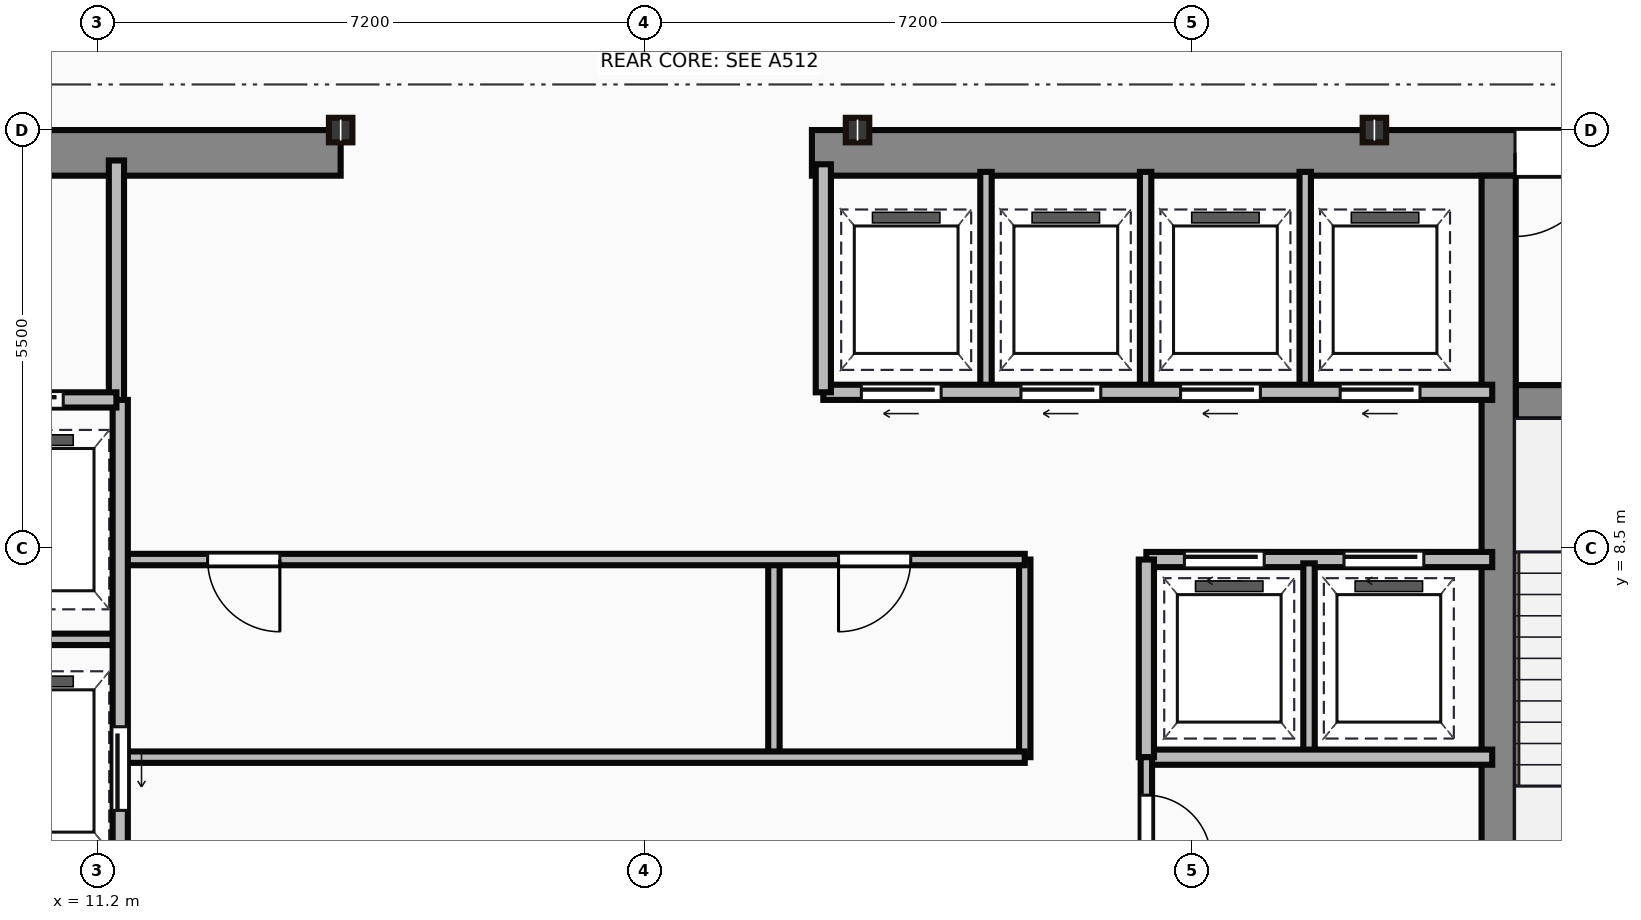
"""IFC4 building model, lengths in metres.
Left out: names, types, materials, properties, quantities, classifications, styles, units other than length and angle.
Written with IfcOpenShell. Run it as: python <this file> out.ifc"""

import sys

from ifc_helpers import new_model, si_unit, direction, frame, frame_2d, origin, origin_2d, place, context, subcontext, project, spatial, rectangle, i_section, extrude, source, transform, mapped, element, fill, save


model = new_model("IFC4")
c1 = context("Model", 3, precision=1e-05, world=origin(), true_north=direction((0.0, 1.0)))
c2 = subcontext(c1, "Body", "Model", "MODEL_VIEW")
j1 = project(units=[si_unit("LENGTHUNIT", "METRE"), si_unit("PLANEANGLEUNIT", "RADIAN")], contexts=[c1])
p1 = place(None, origin())
s1 = spatial("IfcSite", under=j1, at=p1, CompositionType="ELEMENT")
p2 = place(p1, origin())
s2 = spatial("IfcBuilding", under=s1, at=p2, CompositionType="ELEMENT")
p3 = place(p2, frame((0.0, 0.0, 288.0)))
s3 = spatial("IfcBuildingStorey", under=s2, at=p3, CompositionType="ELEMENT", Elevation=288.0)
m1 = source(origin(), c2, "Body", "SweptSolid", [
    extrude(rectangle(XDim=9.1, YDim=0.6, at=frame_2d((4.55, 0.0))), origin(), (0.0, 0.0, 1.0), 4.25),
])
p4 = place(p3, frame((5.3, 13.7, 0.0), z_axis=(0.0, 0.0, 1.0), x_axis=(1.0, 0.0, 0.0)))
e1 = element("IfcWall", 1, at=p4, inside=s3, PredefinedType="SHEAR", context=c2, shape_type="MappedRepresentation", body=[
    mapped(m1, transform((0.0, 0.0, 0.0))),
])
p5 = place(p4, frame((4.1, 0.0, 0.0)))
e2 = element("IfcOpeningElement", 2, at=p5, cuts=e1, PredefinedType="OPENING", context=c2, shape_type="SweptSolid", body=[
    extrude(rectangle(XDim=1.1, YDim=2.15, at=frame_2d((0.55, 1.075))), frame((0.0, 0.31, 0.0), z_axis=(0.0, -1.0, 0.0), x_axis=(1.0, 0.0, 0.0)), (0.0, 0.0, 1.0), 0.62),
])
m2 = source(origin(), c2, "Body", "SweptSolid", [
    extrude(rectangle(XDim=12.6, YDim=0.6, at=frame_2d((6.3, 0.0))), origin(), (0.0, 0.0, 1.0), 4.25),
])
p6 = place(p3, frame((20.6, 13.7, 0.0), z_axis=(0.0, 0.0, 1.0), x_axis=(1.0, 0.0, 0.0)))
e3 = element("IfcWall", 3, at=p6, inside=s3, PredefinedType="SHEAR", context=c2, shape_type="MappedRepresentation", body=[
    mapped(m2, transform((0.0, 0.0, 0.0))),
])
p7 = place(p6, frame((9.25, 0.0, 0.0)))
e4 = element("IfcOpeningElement", 4, at=p7, cuts=e3, PredefinedType="OPENING", context=c2, shape_type="SweptSolid", body=[
    extrude(rectangle(XDim=1.1, YDim=2.15, at=frame_2d((0.55, 1.075))), frame((0.0, 0.31, 0.0), z_axis=(0.0, -1.0, 0.0), x_axis=(1.0, 0.0, 0.0)), (0.0, 0.0, 1.0), 0.62),
])
m3 = source(origin(), c2, "Body", "SweptSolid", [
    extrude(rectangle(XDim=12.5, YDim=0.45, at=frame_2d((6.25, 0.0))), origin(), (0.0, 0.0, 1.0), 4.25),
])
p8 = place(p3, frame((29.635, 0.9, 0.0), z_axis=(0.0, 0.0, 1.0), x_axis=(0.0, 1.0, 0.0)))
e5 = element("IfcWall", 5, at=p8, inside=s3, PredefinedType="SHEAR", context=c2, shape_type="MappedRepresentation", body=[
    mapped(m3, transform((0.0, 0.0, 0.0))),
])
m4 = source(origin(), c2, "Body", "SweptSolid", [
    extrude(rectangle(XDim=3.39, YDim=0.45, at=frame_2d((1.695, 0.0))), origin(), (0.0, 0.0, 1.0), 4.25),
])
p9 = place(p3, frame((29.86, 10.42, 0.0), z_axis=(0.0, 0.0, 1.0), x_axis=(1.0, 0.0, 0.0)))
e6 = element("IfcWall", 6, at=p9, inside=s3, PredefinedType="SHEAR", context=c2, shape_type="MappedRepresentation", body=[
    mapped(m4, transform((0.0, 0.0, 0.0))),
])
p10 = place(p9, frame((1.1, 0.0, 0.0)))
e7 = element("IfcOpeningElement", 7, at=p10, cuts=e6, PredefinedType="OPENING", context=c2, shape_type="SweptSolid", body=[
    extrude(rectangle(XDim=1.1, YDim=2.15, at=frame_2d((0.55, 1.075))), frame((0.0, 0.235, 0.0), z_axis=(0.0, -1.0, 0.0), x_axis=(1.0, 0.0, 0.0)), (0.0, 0.0, 1.0), 0.47),
])
m5 = source(origin(), c2, "Body", "SweptSolid", [
    extrude(i_section(OverallWidth=0.309, OverallDepth=0.323, WebThickness=0.014, FlangeThickness=0.023, at=origin_2d()), origin(), (0.0, 0.0, 1.0), 4.25),
])
for number, where, z_axis, x_axis in (
    (8, (14.4, 14.0, 0.0), (0.0, 0.0, 1.0), (1.0, 0.0, 0.0)),
    (9, (21.2, 14.0, 0.0), (0.0, 0.0, 1.0), (1.0, 0.0, 0.0)),
    (10, (28.0, 14.0, 0.0), (0.0, 0.0, 1.0), (1.0, 0.0, 0.0)),
):
    element("IfcColumn", number, at=place(p3, frame(where, z_axis=z_axis, x_axis=x_axis)), inside=s3, PredefinedType="COLUMN", context=c2, shape_type="MappedRepresentation", body=[
        mapped(m5, transform((0.0, 0.0, 0.0))),
    ])
m6 = source(origin(), c2, "Body", "SweptSolid", [
    extrude(rectangle(XDim=3.18, YDim=0.2, at=frame_2d((1.59, 0.0))), origin(), (0.0, 0.0, 1.0), 3.85),
])
p11 = place(p3, frame((11.45, 10.42, 0.0), z_axis=(0.0, 0.0, 1.0), x_axis=(0.0, 1.0, 0.0)))
e11 = element("IfcWall", 11, at=p11, inside=s3, PredefinedType="PARTITIONING", context=c2, shape_type="MappedRepresentation", body=[
    mapped(m6, transform((0.0, 0.0, 0.0))),
])
m7 = source(origin(), c2, "Body", "SweptSolid", [
    extrude(rectangle(XDim=2.35, YDim=0.2, at=frame_2d((1.175, 0.0))), origin(), (0.0, 0.0, 1.0), 3.85),
])
p12 = place(p3, frame((9.1, 10.45, 0.0), z_axis=(0.0, 0.0, 1.0), x_axis=(1.0, 0.0, 0.0)))
e12 = element("IfcWall", 12, at=p12, inside=s3, PredefinedType="PARTITIONING", context=c2, shape_type="MappedRepresentation", body=[
    mapped(m7, transform((0.0, 0.0, 0.0))),
])
p13 = place(p12, frame((0.55, 0.0, 0.0)))
e13 = element("IfcOpeningElement", 13, at=p13, cuts=e12, PredefinedType="OPENING", context=c2, shape_type="SweptSolid", body=[
    extrude(rectangle(XDim=1.1, YDim=2.15, at=frame_2d((0.55, 1.075))), frame((0.0, 0.11, 0.0), z_axis=(0.0, -1.0, 0.0), x_axis=(1.0, 0.0, 0.0)), (0.0, 0.0, 1.0), 0.22),
])
m8 = source(origin(), c2, "Body", "SweptSolid", [
    extrude(rectangle(XDim=9.6, YDim=0.2, at=frame_2d((4.8, 0.0))), origin(), (0.0, 0.0, 1.0), 3.85),
])
p14 = place(p3, frame((11.5, 0.85, 0.0), z_axis=(0.0, 0.0, 1.0), x_axis=(0.0, 1.0, 0.0)))
e14 = element("IfcWall", 14, at=p14, inside=s3, PredefinedType="PARTITIONING", context=c2, shape_type="MappedRepresentation", body=[
    mapped(m8, transform((0.0, 0.0, 0.0))),
])
p15 = place(p14, frame((4.2, 0.0, 0.0)))
e15 = element("IfcOpeningElement", 15, at=p15, cuts=e14, PredefinedType="OPENING", context=c2, shape_type="SweptSolid", body=[
    extrude(rectangle(XDim=1.1, YDim=2.15, at=frame_2d((0.55, 1.075))), frame((0.0, 0.11, 0.0), z_axis=(0.0, -1.0, 0.0), x_axis=(1.0, 0.0, 0.0)), (0.0, 0.0, 1.0), 0.22),
])
p16 = place(p14, frame((0.9, 0.0, 0.0)))
e16 = element("IfcOpeningElement", 16, at=p16, cuts=e14, PredefinedType="OPENING", context=c2, shape_type="SweptSolid", body=[
    extrude(rectangle(XDim=1.2, YDim=2.15, at=frame_2d((0.6, 1.075))), frame((0.0, 0.11, 0.0), z_axis=(0.0, -1.0, 0.0), x_axis=(1.0, 0.0, 0.0)), (0.0, 0.0, 1.0), 0.22),
])
m9 = source(origin(), c2, "Body", "SweptSolid", [
    extrude(rectangle(XDim=2.4, YDim=0.15, at=frame_2d((1.2, 0.0))), origin(), (0.0, 0.0, 1.0), 3.85),
])
p17 = place(p3, frame((9.1, 7.3, 0.0), z_axis=(0.0, 0.0, 1.0), x_axis=(1.0, 0.0, 0.0)))
e17 = element("IfcWall", 17, at=p17, inside=s3, PredefinedType="PARTITIONING", context=c2, shape_type="MappedRepresentation", body=[
    mapped(m9, transform((0.0, 0.0, 0.0))),
])
m10 = source(origin(), c2, "Body", "SweptSolid", [
    extrude(rectangle(XDim=11.85, YDim=0.15, at=frame_2d((5.925, 0.0))), origin(), (0.0, 0.0, 1.0), 3.85),
])
p18 = place(p3, frame((11.55, 5.75, 0.0), z_axis=(0.0, 0.0, 1.0), x_axis=(1.0, 0.0, 0.0)))
e18 = element("IfcWall", 18, at=p18, inside=s3, PredefinedType="PARTITIONING", context=c2, shape_type="MappedRepresentation", body=[
    mapped(m10, transform((0.0, 0.0, 0.0))),
])
p19 = place(p3, frame((11.55, 8.35, 0.0), z_axis=(0.0, 0.0, 1.0), x_axis=(1.0, 0.0, 0.0)))
e19 = element("IfcWall", 19, at=p19, inside=s3, PredefinedType="PARTITIONING", context=c2, shape_type="MappedRepresentation", body=[
    mapped(m10, transform((0.0, 0.0, 0.0))),
])
p20 = place(p19, frame((1.1, 0.0, 0.0)))
e20 = element("IfcOpeningElement", 20, at=p20, cuts=e19, PredefinedType="OPENING", context=c2, shape_type="SweptSolid", body=[
    extrude(rectangle(XDim=0.95, YDim=2.15, at=frame_2d((0.475, 1.075))), frame((0.0, 0.085, 0.0), z_axis=(0.0, -1.0, 0.0), x_axis=(1.0, 0.0, 0.0)), (0.0, 0.0, 1.0), 0.17),
])
p21 = place(p19, frame((9.4, 0.0, 0.0)))
e21 = element("IfcOpeningElement", 21, at=p21, cuts=e19, PredefinedType="OPENING", context=c2, shape_type="SweptSolid", body=[
    extrude(rectangle(XDim=0.95, YDim=2.15, at=frame_2d((0.475, 1.075))), frame((0.0, 0.085, 0.0), z_axis=(0.0, -1.0, 0.0), x_axis=(1.0, 0.0, 0.0)), (0.0, 0.0, 1.0), 0.17),
])
m11 = source(origin(), c2, "Body", "SweptSolid", [
    extrude(rectangle(XDim=2.6, YDim=0.15, at=frame_2d((1.3, 0.0))), origin(), (0.0, 0.0, 1.0), 3.85),
])
p22 = place(p3, frame((23.4, 5.75, 0.0), z_axis=(0.0, 0.0, 1.0), x_axis=(0.0, 1.0, 0.0)))
e22 = element("IfcWall", 22, at=p22, inside=s3, PredefinedType="PARTITIONING", context=c2, shape_type="MappedRepresentation", body=[
    mapped(m11, transform((0.0, 0.0, 0.0))),
])
m12 = source(origin(), c2, "Body", "SweptSolid", [
    extrude(rectangle(XDim=2.5, YDim=0.15, at=frame_2d((1.25, 0.0))), origin(), (0.0, 0.0, 1.0), 3.85),
])
p23 = place(p3, frame((20.1, 5.8, 0.0), z_axis=(0.0, 0.0, 1.0), x_axis=(0.0, 1.0, 0.0)))
e23 = element("IfcWall", 23, at=p23, inside=s3, PredefinedType="PARTITIONING", context=c2, shape_type="MappedRepresentation", body=[
    mapped(m12, transform((0.0, 0.0, 0.0))),
])
m13 = source(origin(), c2, "Body", "SweptSolid", [
    extrude(rectangle(XDim=8.8, YDim=0.2, at=frame_2d((4.4, 0.0))), origin(), (0.0, 0.0, 1.0), 3.85),
])
p24 = place(p3, frame((20.75, 10.55, 0.0), z_axis=(0.0, 0.0, 1.0), x_axis=(1.0, 0.0, 0.0)))
e24 = element("IfcWall", 24, at=p24, inside=s3, PredefinedType="PARTITIONING", context=c2, shape_type="MappedRepresentation", body=[
    mapped(m13, transform((0.0, 0.0, 0.0))),
])
p25 = place(p24, frame((0.5, 0.0, 0.0)))
e25 = element("IfcOpeningElement", 25, at=p25, cuts=e24, PredefinedType="OPENING", context=c2, shape_type="SweptSolid", body=[
    extrude(rectangle(XDim=1.05, YDim=2.15, at=frame_2d((0.525, 1.075))), frame((0.0, 0.11, 0.0), z_axis=(0.0, -1.0, 0.0), x_axis=(1.0, 0.0, 0.0)), (0.0, 0.0, 1.0), 0.22),
])
p26 = place(p24, frame((2.6, 0.0, 0.0)))
e26 = element("IfcOpeningElement", 26, at=p26, cuts=e24, PredefinedType="OPENING", context=c2, shape_type="SweptSolid", body=[
    extrude(rectangle(XDim=1.05, YDim=2.15, at=frame_2d((0.525, 1.075))), frame((0.0, 0.11, 0.0), z_axis=(0.0, -1.0, 0.0), x_axis=(1.0, 0.0, 0.0)), (0.0, 0.0, 1.0), 0.22),
])
p27 = place(p24, frame((4.7, 0.0, 0.0)))
e27 = element("IfcOpeningElement", 27, at=p27, cuts=e24, PredefinedType="OPENING", context=c2, shape_type="SweptSolid", body=[
    extrude(rectangle(XDim=1.05, YDim=2.15, at=frame_2d((0.525, 1.075))), frame((0.0, 0.11, 0.0), z_axis=(0.0, -1.0, 0.0), x_axis=(1.0, 0.0, 0.0)), (0.0, 0.0, 1.0), 0.22),
])
p28 = place(p24, frame((6.8, 0.0, 0.0)))
e28 = element("IfcOpeningElement", 28, at=p28, cuts=e24, PredefinedType="OPENING", context=c2, shape_type="SweptSolid", body=[
    extrude(rectangle(XDim=1.05, YDim=2.15, at=frame_2d((0.525, 1.075))), frame((0.0, 0.11, 0.0), z_axis=(0.0, -1.0, 0.0), x_axis=(1.0, 0.0, 0.0)), (0.0, 0.0, 1.0), 0.22),
])
m14 = source(origin(), c2, "Body", "SweptSolid", [
    extrude(rectangle(XDim=3.0, YDim=0.2, at=frame_2d((1.5, 0.0))), origin(), (0.0, 0.0, 1.0), 3.85),
])
p29 = place(p3, frame((20.75, 10.55, 0.0), z_axis=(0.0, 0.0, 1.0), x_axis=(0.0, 1.0, 0.0)))
e29 = element("IfcWall", 29, at=p29, inside=s3, PredefinedType="PARTITIONING", context=c2, shape_type="MappedRepresentation", body=[
    mapped(m14, transform((0.0, 0.0, 0.0))),
])
m15 = source(origin(), c2, "Body", "SweptSolid", [
    extrude(rectangle(XDim=2.85, YDim=0.15, at=frame_2d((1.425, 0.0))), origin(), (0.0, 0.0, 1.0), 3.85),
])
for number, where, z_axis, x_axis in (
    (30, (22.89, 10.6, 0.0), (0.0, 0.0, 1.0), (0.0, 1.0, 0.0)),
    (31, (24.99, 10.6, 0.0), (0.0, 0.0, 1.0), (0.0, 1.0, 0.0)),
    (32, (27.09, 10.6, 0.0), (0.0, 0.0, 1.0), (0.0, 1.0, 0.0)),
):
    element("IfcWall", number, at=place(p3, frame(where, z_axis=z_axis, x_axis=x_axis)), inside=s3, PredefinedType="PARTITIONING", context=c2, shape_type="MappedRepresentation", body=[
        mapped(m15, transform((0.0, 0.0, 0.0))),
    ])
m16 = source(origin(), c2, "Body", "SweptSolid", [
    extrude(rectangle(XDim=4.55, YDim=0.2, at=frame_2d((2.275, 0.0))), origin(), (0.0, 0.0, 1.0), 3.85),
])
p30 = place(p3, frame((25.0, 8.35, 0.0), z_axis=(0.0, 0.0, 1.0), x_axis=(1.0, 0.0, 0.0)))
e33 = element("IfcWall", 33, at=p30, inside=s3, PredefinedType="PARTITIONING", context=c2, shape_type="MappedRepresentation", body=[
    mapped(m16, transform((0.0, 0.0, 0.0))),
])
p31 = place(p30, frame((0.5, 0.0, 0.0)))
e34 = element("IfcOpeningElement", 34, at=p31, cuts=e33, PredefinedType="OPENING", context=c2, shape_type="SweptSolid", body=[
    extrude(rectangle(XDim=1.05, YDim=2.15, at=frame_2d((0.525, 1.075))), frame((0.0, 0.11, 0.0), z_axis=(0.0, -1.0, 0.0), x_axis=(1.0, 0.0, 0.0)), (0.0, 0.0, 1.0), 0.22),
])
p32 = place(p30, frame((2.6, 0.0, 0.0)))
e35 = element("IfcOpeningElement", 35, at=p32, cuts=e33, PredefinedType="OPENING", context=c2, shape_type="SweptSolid", body=[
    extrude(rectangle(XDim=1.05, YDim=2.15, at=frame_2d((0.525, 1.075))), frame((0.0, 0.11, 0.0), z_axis=(0.0, -1.0, 0.0), x_axis=(1.0, 0.0, 0.0)), (0.0, 0.0, 1.0), 0.22),
])
p33 = place(p3, frame((25.0, 5.75, 0.0), z_axis=(0.0, 0.0, 1.0), x_axis=(1.0, 0.0, 0.0)))
e36 = element("IfcWall", 36, at=p33, inside=s3, PredefinedType="PARTITIONING", context=c2, shape_type="MappedRepresentation", body=[
    mapped(m16, transform((0.0, 0.0, 0.0))),
])
m17 = source(origin(), c2, "Body", "SweptSolid", [
    extrude(rectangle(XDim=2.6, YDim=0.2, at=frame_2d((1.3, 0.0))), origin(), (0.0, 0.0, 1.0), 3.85),
])
p34 = place(p3, frame((25.0, 5.75, 0.0), z_axis=(0.0, 0.0, 1.0), x_axis=(0.0, 1.0, 0.0)))
e37 = element("IfcWall", 37, at=p34, inside=s3, PredefinedType="PARTITIONING", context=c2, shape_type="MappedRepresentation", body=[
    mapped(m17, transform((0.0, 0.0, 0.0))),
])
p35 = place(p3, frame((27.14, 5.8, 0.0), z_axis=(0.0, 0.0, 1.0), x_axis=(0.0, 1.0, 0.0)))
e38 = element("IfcWall", 38, at=p35, inside=s3, PredefinedType="PARTITIONING", context=c2, shape_type="MappedRepresentation", body=[
    mapped(m12, transform((0.0, 0.0, 0.0))),
])
m18 = source(origin(), c2, "Body", "SweptSolid", [
    extrude(rectangle(XDim=4.9, YDim=0.15, at=frame_2d((2.45, 0.0))), origin(), (0.0, 0.0, 1.0), 3.85),
])
p36 = place(p3, frame((25.0, 0.85, 0.0), z_axis=(0.0, 0.0, 1.0), x_axis=(0.0, 1.0, 0.0)))
e39 = element("IfcWall", 39, at=p36, inside=s3, PredefinedType="PARTITIONING", context=c2, shape_type="MappedRepresentation", body=[
    mapped(m18, transform((0.0, 0.0, 0.0))),
])
p37 = place(p36, frame((1.85, 0.0, 0.0)))
e40 = element("IfcOpeningElement", 40, at=p37, cuts=e39, PredefinedType="OPENING", context=c2, shape_type="SweptSolid", body=[
    extrude(rectangle(XDim=0.95, YDim=2.15, at=frame_2d((0.475, 1.075))), frame((0.0, 0.085, 0.0), z_axis=(0.0, -1.0, 0.0), x_axis=(1.0, 0.0, 0.0)), (0.0, 0.0, 1.0), 0.17),
])
p38 = place(p36, frame((3.55, 0.0, 0.0)))
e41 = element("IfcOpeningElement", 41, at=p38, cuts=e39, PredefinedType="OPENING", context=c2, shape_type="SweptSolid", body=[
    extrude(rectangle(XDim=0.85, YDim=2.15, at=frame_2d((0.425, 1.075))), frame((0.0, 0.085, 0.0), z_axis=(0.0, -1.0, 0.0), x_axis=(1.0, 0.0, 0.0)), (0.0, 0.0, 1.0), 0.17),
])
m19 = source(origin(), c2, "Body", "SweptSolid", [
    extrude(rectangle(XDim=1.1, YDim=2.15, at=frame_2d((0.55, 1.075))), frame((0.0, 0.025, 0.0), z_axis=(0.0, -1.0, 0.0), x_axis=(1.0, 0.0, 0.0)), (0.0, 0.0, 1.0), 0.05),
])
p39 = place(p7, origin())
e42 = element("IfcDoor", 42, at=p39, inside=s3, OperationType="SINGLE_SWING_LEFT", PredefinedType="DOOR", context=c2, shape_type="MappedRepresentation", body=[
    mapped(m19, transform((0.0, 0.0, 0.0))),
])
fill(e4, e42)
p40 = place(p13, origin())
e43 = element("IfcDoor", 43, at=p40, inside=s3, OperationType="SLIDING_TO_LEFT", PredefinedType="DOOR", context=c2, shape_type="MappedRepresentation", body=[
    mapped(m19, transform((0.0, 0.0, 0.0))),
])
fill(e13, e43)
p41 = place(p15, frame((1.1, 0.0, 0.0), z_axis=(0.0, 0.0, 1.0), x_axis=(-1.0, 0.0, 0.0)))
e44 = element("IfcDoor", 44, at=p41, inside=s3, OperationType="SLIDING_TO_LEFT", PredefinedType="DOOR", context=c2, shape_type="MappedRepresentation", body=[
    mapped(m19, transform((0.0, 0.0, 0.0))),
])
fill(e15, e44)
m20 = source(origin(), c2, "Body", "SweptSolid", [
    extrude(rectangle(XDim=0.95, YDim=2.15, at=frame_2d((0.475, 1.075))), frame((0.0, 0.025, 0.0), z_axis=(0.0, -1.0, 0.0), x_axis=(1.0, 0.0, 0.0)), (0.0, 0.0, 1.0), 0.05),
])
p42 = place(p20, origin())
e45 = element("IfcDoor", 45, at=p42, inside=s3, OperationType="SINGLE_SWING_RIGHT", PredefinedType="DOOR", context=c2, shape_type="MappedRepresentation", body=[
    mapped(m20, transform((0.0, 0.0, 0.0))),
])
fill(e20, e45)
p43 = place(p21, origin())
e46 = element("IfcDoor", 46, at=p43, inside=s3, OperationType="SINGLE_SWING_LEFT", PredefinedType="DOOR", context=c2, shape_type="MappedRepresentation", body=[
    mapped(m20, transform((0.0, 0.0, 0.0))),
])
fill(e21, e46)
m21 = source(origin(), c2, "Body", "SweptSolid", [
    extrude(rectangle(XDim=1.05, YDim=2.15, at=frame_2d((0.525, 1.075))), frame((0.0, 0.025, 0.0), z_axis=(0.0, -1.0, 0.0), x_axis=(1.0, 0.0, 0.0)), (0.0, 0.0, 1.0), 0.05),
])
p44 = place(p25, frame((1.05, 0.0, 0.0), z_axis=(0.0, 0.0, 1.0), x_axis=(-1.0, 0.0, 0.0)))
e47 = element("IfcDoor", 47, at=p44, inside=s3, OperationType="SLIDING_TO_LEFT", PredefinedType="DOOR", context=c2, shape_type="MappedRepresentation", body=[
    mapped(m21, transform((0.0, 0.0, 0.0))),
])
fill(e25, e47)
p45 = place(p26, frame((1.05, 0.0, 0.0), z_axis=(0.0, 0.0, 1.0), x_axis=(-1.0, 0.0, 0.0)))
e48 = element("IfcDoor", 48, at=p45, inside=s3, OperationType="SLIDING_TO_LEFT", PredefinedType="DOOR", context=c2, shape_type="MappedRepresentation", body=[
    mapped(m21, transform((0.0, 0.0, 0.0))),
])
fill(e26, e48)
p46 = place(p27, frame((1.05, 0.0, 0.0), z_axis=(0.0, 0.0, 1.0), x_axis=(-1.0, 0.0, 0.0)))
e49 = element("IfcDoor", 49, at=p46, inside=s3, OperationType="SLIDING_TO_LEFT", PredefinedType="DOOR", context=c2, shape_type="MappedRepresentation", body=[
    mapped(m21, transform((0.0, 0.0, 0.0))),
])
fill(e27, e49)
p47 = place(p28, frame((1.05, 0.0, 0.0), z_axis=(0.0, 0.0, 1.0), x_axis=(-1.0, 0.0, 0.0)))
e50 = element("IfcDoor", 50, at=p47, inside=s3, OperationType="SLIDING_TO_LEFT", PredefinedType="DOOR", context=c2, shape_type="MappedRepresentation", body=[
    mapped(m21, transform((0.0, 0.0, 0.0))),
])
fill(e28, e50)
p48 = place(p31, origin())
e51 = element("IfcDoor", 51, at=p48, inside=s3, OperationType="SLIDING_TO_LEFT", PredefinedType="DOOR", context=c2, shape_type="MappedRepresentation", body=[
    mapped(m21, transform((0.0, 0.0, 0.0))),
])
fill(e34, e51)
p49 = place(p32, origin())
e52 = element("IfcDoor", 52, at=p49, inside=s3, OperationType="SLIDING_TO_LEFT", PredefinedType="DOOR", context=c2, shape_type="MappedRepresentation", body=[
    mapped(m21, transform((0.0, 0.0, 0.0))),
])
fill(e35, e52)
m22 = source(origin(), c2, "Body", "SweptSolid", [
    extrude(rectangle(XDim=0.85, YDim=2.15, at=frame_2d((0.425, 1.075))), frame((0.0, 0.025, 0.0), z_axis=(0.0, -1.0, 0.0), x_axis=(1.0, 0.0, 0.0)), (0.0, 0.0, 1.0), 0.05),
])
p50 = place(p38, origin())
e53 = element("IfcDoor", 53, at=p50, inside=s3, OperationType="SINGLE_SWING_LEFT", PredefinedType="DOOR", context=c2, shape_type="MappedRepresentation", body=[
    mapped(m22, transform((0.0, 0.0, 0.0))),
])
fill(e41, e53)
save(model, sys.argv[1])
